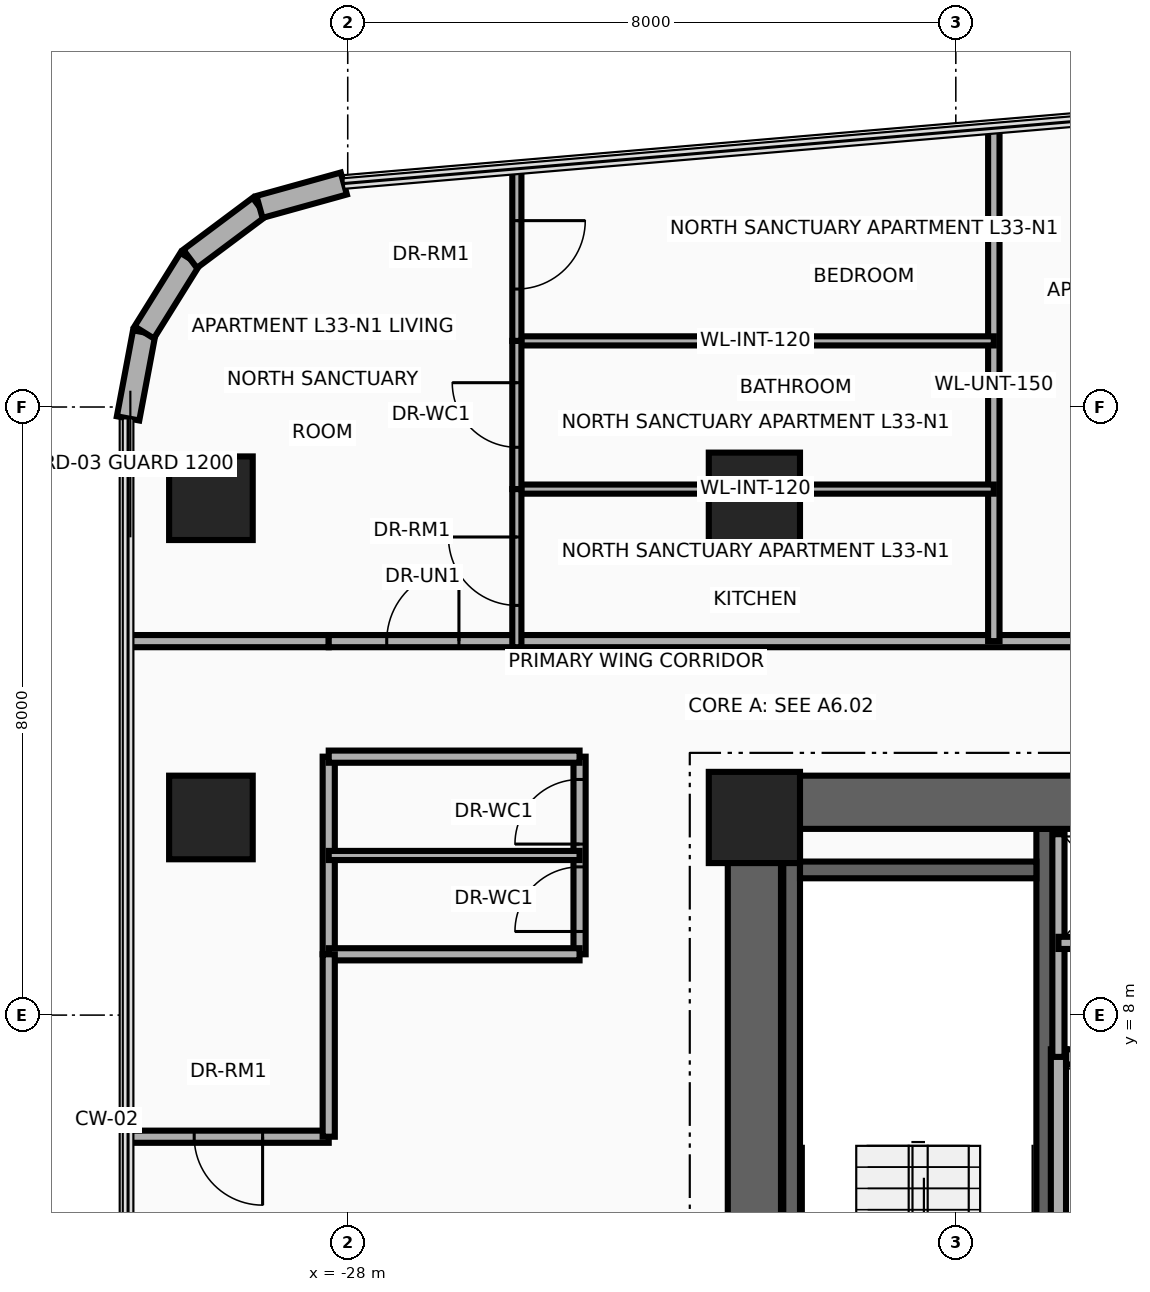
"""IFC4 building model, lengths in metres.
Left out: names, types, materials, properties, quantities, classifications, styles, units other than length and angle.
Written with IfcOpenShell. Run it as: python <this file> out.ifc"""

import sys

from ifc_helpers import new_model, si_unit, direction, frame, frame_2d, origin, origin_2d, place, context, subcontext, project, spatial, rectangle, circle, extrude, source, transform, mapped, element, fill, save


model = new_model("IFC4")
c1 = context("Model", 3, precision=1e-05, world=origin(), true_north=direction((0.0, 1.0)))
c2 = subcontext(c1, "Body", "Model", "MODEL_VIEW")
j1 = project(units=[si_unit("LENGTHUNIT", "METRE"), si_unit("PLANEANGLEUNIT", "RADIAN")], contexts=[c1])
p1 = place(None, origin())
s1 = spatial("IfcSite", under=j1, at=p1, CompositionType="ELEMENT")
p2 = place(p1, origin())
s2 = spatial("IfcBuilding", under=s1, at=p2, CompositionType="ELEMENT")
p3 = place(p2, frame((0.0, 0.0, 131.6)))
s3 = spatial("IfcBuildingStorey", under=s2, at=p3, CompositionType="ELEMENT", Elevation=131.6)
for number, where, z_axis, x_axis in (
    (1, (-22.16, 1.78, 0.0), (0.0, 0.0, 1.0), (0.0, 1.0, 0.0)),
    (2, (-18.83, 1.78, 0.0), (0.0, 0.0, 1.0), (0.0, 1.0, 0.0)),
):
    element("IfcWall", number, at=place(p3, frame(where, z_axis=z_axis, x_axis=x_axis)), inside=s3, PredefinedType="SHEAR", context=c2, shape_type="SweptSolid", body=[
        extrude(rectangle(XDim=8.67, YDim=0.22, at=frame_2d((4.335, 0.0))), origin(), (0.0, 0.0, 1.0), 3.46),
    ])
p4 = place(p3, frame((-22.05, 9.91, 0.0), z_axis=(0.0, 0.0, 1.0), x_axis=(1.0, 0.0, 0.0)))
e3 = element("IfcWall", 3, at=p4, inside=s3, PredefinedType="SHEAR", context=c2, shape_type="SweptSolid", body=[
    extrude(rectangle(XDim=3.11, YDim=0.22, at=frame_2d((1.555, 0.0))), origin(), (0.0, 0.0, 1.0), 3.46),
])
p5 = place(p3, frame((-22.65, -11.15, 0.0), z_axis=(0.0, 0.0, 1.0), x_axis=(0.0, 1.0, 0.0)))
e4 = element("IfcWall", 4, at=p5, inside=s3, PredefinedType="SHEAR", context=c2, shape_type="SweptSolid", body=[
    extrude(rectangle(XDim=22.3, YDim=0.7, at=frame_2d((11.15, 0.0))), origin(), (0.0, 0.0, 1.0), 3.46),
])
p6 = place(p3, frame((-22.65, 10.8, 0.0), z_axis=(0.0, 0.0, 1.0), x_axis=(1.0, 0.0, 0.0)))
e5 = element("IfcWall", 5, at=p6, inside=s3, PredefinedType="SHEAR", context=c2, shape_type="SweptSolid", body=[
    extrude(rectangle(XDim=10.25, YDim=0.7, at=frame_2d((5.125, 0.0))), origin(), (0.0, 0.0, 1.0), 3.46),
])
m1 = source(origin(), c2, "Body", "SweptSolid", [
    extrude(circle(Radius=0.55, at=origin_2d()), origin(), (0.0, 0.0, 1.0), 3.7),
])
p7 = place(p3, frame((-29.8, 10.6, 0.0), z_axis=(0.0, 0.0, 1.0), x_axis=(1.0, 0.0, 0.0)))
e6 = element("IfcColumn", 6, at=p7, inside=s3, PredefinedType="COLUMN", context=c2, shape_type="MappedRepresentation", body=[
    mapped(m1, transform((0.0, 0.0, 0.0), x_axis=(1.0, 0.0, 0.0), y_axis=(0.0, 1.0, 0.0), z_axis=(0.0, 0.0, 1.0), scale=1.0)),
])
m2 = source(origin(), c2, "Body", "SweptSolid", [
    extrude(rectangle(XDim=1.2, YDim=1.2, at=origin_2d()), origin(), (0.0, 0.0, 1.0), 3.7),
])
p8 = place(p3, frame((-22.65, 10.6, 0.0), z_axis=(0.0, 0.0, 1.0), x_axis=(1.0, 0.0, 0.0)))
e7 = element("IfcColumn", 7, at=p8, inside=s3, PredefinedType="COLUMN", context=c2, shape_type="MappedRepresentation", body=[
    mapped(m2, transform((0.0, 0.0, 0.0), x_axis=(1.0, 0.0, 0.0), y_axis=(0.0, 1.0, 0.0), z_axis=(0.0, 0.0, 1.0), scale=1.0)),
])
p9 = place(p3, frame((-29.8, 14.8, 0.0), z_axis=(0.0, 0.0, 1.0), x_axis=(1.0, 0.0, 0.0)))
e8 = element("IfcColumn", 8, at=p9, inside=s3, PredefinedType="COLUMN", context=c2, shape_type="MappedRepresentation", body=[
    mapped(m1, transform((0.0, 0.0, 0.0), x_axis=(1.0, 0.0, 0.0), y_axis=(0.0, 1.0, 0.0), z_axis=(0.0, 0.0, 1.0), scale=1.0)),
])
p10 = place(p3, frame((-22.65, 14.8, 0.0), z_axis=(0.0, 0.0, 1.0), x_axis=(1.0, 0.0, 0.0)))
e9 = element("IfcColumn", 9, at=p10, inside=s3, PredefinedType="COLUMN", context=c2, shape_type="MappedRepresentation", body=[
    mapped(m2, transform((0.0, 0.0, 0.0), x_axis=(1.0, 0.0, 0.0), y_axis=(0.0, 1.0, 0.0), z_axis=(0.0, 0.0, 1.0), scale=1.0)),
])
p11 = place(p3, frame((-30.89, 15.85, 0.0), z_axis=(0.0, 0.0, 1.0), x_axis=(0.184557499391, 0.982821718023, 0.0)))
e10 = element("IfcWall", 10, at=p11, inside=s3, PredefinedType="SOLIDWALL", context=c2, shape_type="SweptSolid", body=[
    extrude(rectangle(XDim=1.151, YDim=0.3, at=frame_2d((0.575, 0.0))), origin(), (0.0, 0.0, 1.0), 3.46),
])
p12 = place(p3, frame((-30.677, 16.981, 0.0), z_axis=(0.0, 0.0, 1.0), x_axis=(0.52880576008, 0.848742875143, 0.0)))
e11 = element("IfcWall", 11, at=p12, inside=s3, PredefinedType="SOLIDWALL", context=c2, shape_type="SweptSolid", body=[
    extrude(rectangle(XDim=1.141, YDim=0.3, at=frame_2d((0.57, 0.0))), origin(), (0.0, 0.0, 1.0), 3.46),
])
p13 = place(p3, frame((-30.074, 17.95, 0.0), z_axis=(0.0, 0.0, 1.0), x_axis=(0.800975009324, 0.598697782223, 0.0)))
e12 = element("IfcWall", 12, at=p13, inside=s3, PredefinedType="SOLIDWALL", context=c2, shape_type="SweptSolid", body=[
    extrude(rectangle(XDim=1.141, YDim=0.3, at=frame_2d((0.57, 0.0))), origin(), (0.0, 0.0, 1.0), 3.46),
])
p14 = place(p3, frame((-29.161, 18.633, 0.0), z_axis=(0.0, 0.0, 1.0), x_axis=(0.963624193367, 0.267260947313, 0.0)))
e13 = element("IfcWall", 13, at=p14, inside=s3, PredefinedType="SOLIDWALL", context=c2, shape_type="SweptSolid", body=[
    extrude(rectangle(XDim=1.151, YDim=0.3, at=frame_2d((0.575, 0.0))), origin(), (0.0, 0.0, 1.0), 3.46),
])
p15 = place(p3, frame((-18.65, 4.225, 0.0), z_axis=(0.0, 0.0, 1.0), x_axis=(0.0, 1.0, 0.0)))
e14 = element("IfcWall", 14, at=p15, inside=s3, PredefinedType="MOVABLE", context=c2, shape_type="SweptSolid", body=[
    extrude(rectangle(XDim=3.325, YDim=0.2, at=frame_2d((1.663, 0.0))), origin(), (0.0, 0.0, 1.0), 3.46),
])
p16 = place(p3, frame((-18.55, 7.45, 0.0), z_axis=(0.0, 0.0, 1.0), x_axis=(1.0, 0.0, 0.0)))
e15 = element("IfcWall", 15, at=p16, inside=s3, PredefinedType="MOVABLE", context=c2, shape_type="SweptSolid", body=[
    extrude(rectangle(XDim=2.6, YDim=0.2, at=frame_2d((1.3, 0.0))), origin(), (0.0, 0.0, 1.0), 3.46),
])
p17 = place(p16, frame((0.7, 0.0, 0.0)))
e16 = element("IfcOpeningElement", 16, at=p17, cuts=e15, PredefinedType="OPENING", context=c2, shape_type="SweptSolid", body=[
    extrude(rectangle(XDim=1.2, YDim=2.1, at=frame_2d((0.6, 1.05))), frame((0.0, 0.115, 0.0), z_axis=(0.0, -1.0, 0.0), x_axis=(1.0, 0.0, 0.0)), (0.0, 0.0, 1.0), 0.23),
])
p18 = place(p3, frame((-18.65, 7.45, 0.0), z_axis=(0.0, 0.0, 1.0), x_axis=(0.0, 1.0, 0.0)))
e17 = element("IfcWall", 17, at=p18, inside=s3, PredefinedType="PARTITIONING", context=c2, shape_type="SweptSolid", body=[
    extrude(rectangle(XDim=2.93, YDim=0.16, at=frame_2d((1.465, 0.0))), origin(), (0.0, 0.0, 1.0), 3.46),
])
p19 = place(p3, frame((-18.65, 8.95, 0.0), z_axis=(0.0, 0.0, 1.0), x_axis=(1.0, 0.0, 0.0)))
e18 = element("IfcWall", 18, at=p19, inside=s3, PredefinedType="PARTITIONING", context=c2, shape_type="SweptSolid", body=[
    extrude(rectangle(XDim=5.5, YDim=0.16, at=frame_2d((2.75, 0.0))), origin(), (0.0, 0.0, 1.0), 3.46),
])
p20 = place(p19, frame((0.3, 0.0, 0.0)))
e19 = element("IfcOpeningElement", 19, at=p20, cuts=e18, PredefinedType="OPENING", context=c2, shape_type="SweptSolid", body=[
    extrude(rectangle(XDim=0.85, YDim=2.05, at=frame_2d((0.425, 1.025))), frame((0.0, 0.095, 0.0), z_axis=(0.0, -1.0, 0.0), x_axis=(1.0, 0.0, 0.0)), (0.0, 0.0, 1.0), 0.19),
])
p21 = place(p19, frame((1.85, 0.0, 0.0)))
e20 = element("IfcOpeningElement", 20, at=p21, cuts=e18, PredefinedType="OPENING", context=c2, shape_type="SweptSolid", body=[
    extrude(rectangle(XDim=0.85, YDim=2.05, at=frame_2d((0.425, 1.025))), frame((0.0, 0.095, 0.0), z_axis=(0.0, -1.0, 0.0), x_axis=(1.0, 0.0, 0.0)), (0.0, 0.0, 1.0), 0.19),
])
p22 = place(p19, frame((3.9, 0.0, 0.0)))
e21 = element("IfcOpeningElement", 21, at=p22, cuts=e18, PredefinedType="OPENING", context=c2, shape_type="SweptSolid", body=[
    extrude(rectangle(XDim=0.85, YDim=2.05, at=frame_2d((0.425, 1.025))), frame((0.0, 0.095, 0.0), z_axis=(0.0, -1.0, 0.0), x_axis=(1.0, 0.0, 0.0)), (0.0, 0.0, 1.0), 0.19),
])
p23 = place(p3, frame((-28.25, 8.8, 0.0), z_axis=(0.0, 0.0, 1.0), x_axis=(0.0, 1.0, 0.0)))
e22 = element("IfcWall", 22, at=p23, inside=s3, PredefinedType="PARTITIONING", context=c2, shape_type="SweptSolid", body=[
    extrude(rectangle(XDim=2.6, YDim=0.16, at=frame_2d((1.3, 0.0))), origin(), (0.0, 0.0, 1.0), 2.666),
])
p24 = place(p3, frame((-24.95, 8.8, 0.0), z_axis=(0.0, 0.0, 1.0), x_axis=(0.0, 1.0, 0.0)))
e23 = element("IfcWall", 23, at=p24, inside=s3, PredefinedType="PARTITIONING", context=c2, shape_type="SweptSolid", body=[
    extrude(rectangle(XDim=2.6, YDim=0.16, at=frame_2d((1.3, 0.0))), origin(), (0.0, 0.0, 1.0), 2.666),
])
p25 = place(p24, frame((0.3, 0.0, 0.0)))
e24 = element("IfcOpeningElement", 24, at=p25, cuts=e23, PredefinedType="OPENING", context=c2, shape_type="SweptSolid", body=[
    extrude(rectangle(XDim=0.85, YDim=2.1, at=frame_2d((0.425, 1.05))), frame((0.0, 0.095, 0.0), z_axis=(0.0, -1.0, 0.0), x_axis=(1.0, 0.0, 0.0)), (0.0, 0.0, 1.0), 0.19),
])
p26 = place(p24, frame((1.45, 0.0, 0.0)))
e25 = element("IfcOpeningElement", 25, at=p26, cuts=e23, PredefinedType="OPENING", context=c2, shape_type="SweptSolid", body=[
    extrude(rectangle(XDim=0.85, YDim=2.1, at=frame_2d((0.425, 1.05))), frame((0.0, 0.095, 0.0), z_axis=(0.0, -1.0, 0.0), x_axis=(1.0, 0.0, 0.0)), (0.0, 0.0, 1.0), 0.19),
])
for number, where, z_axis, x_axis in (
    (26, (-28.25, 8.8, 0.0), (0.0, 0.0, 1.0), (1.0, 0.0, 0.0)),
    (27, (-28.25, 11.4, 0.0), (0.0, 0.0, 1.0), (1.0, 0.0, 0.0)),
):
    element("IfcWall", number, at=place(p3, frame(where, z_axis=z_axis, x_axis=x_axis)), inside=s3, PredefinedType="PARTITIONING", context=c2, shape_type="SweptSolid", body=[
        extrude(rectangle(XDim=3.3, YDim=0.16, at=frame_2d((1.65, 0.0))), origin(), (0.0, 0.0, 1.0), 3.46),
    ])
p27 = place(p3, frame((-28.25, 10.1, 0.0), z_axis=(0.0, 0.0, 1.0), x_axis=(1.0, 0.0, 0.0)))
e28 = element("IfcWall", 28, at=p27, inside=s3, PredefinedType="PARTITIONING", context=c2, shape_type="SweptSolid", body=[
    extrude(rectangle(XDim=3.3, YDim=0.12, at=frame_2d((1.65, 0.0))), origin(), (0.0, 0.0, 1.0), 3.46),
])
p28 = place(p3, frame((-30.89, 6.4, 0.0), z_axis=(0.0, 0.0, 1.0), x_axis=(1.0, 0.0, 0.0)))
e29 = element("IfcWall", 29, at=p28, inside=s3, PredefinedType="PARTITIONING", context=c2, shape_type="SweptSolid", body=[
    extrude(rectangle(XDim=2.64, YDim=0.16, at=frame_2d((1.32, 0.0))), origin(), (0.0, 0.0, 1.0), 2.896),
])
p29 = place(p28, frame((0.87, 0.0, 0.0)))
e30 = element("IfcOpeningElement", 30, at=p29, cuts=e29, PredefinedType="OPENING", context=c2, shape_type="SweptSolid", body=[
    extrude(rectangle(XDim=0.9, YDim=2.1, at=frame_2d((0.45, 1.05))), frame((0.0, 0.095, 0.0), z_axis=(0.0, -1.0, 0.0), x_axis=(1.0, 0.0, 0.0)), (0.0, 0.0, 1.0), 0.19),
])
p30 = place(p3, frame((-28.25, 6.4, 0.0), z_axis=(0.0, 0.0, 1.0), x_axis=(0.0, 1.0, 0.0)))
e31 = element("IfcWall", 31, at=p30, inside=s3, PredefinedType="PARTITIONING", context=c2, shape_type="SweptSolid", body=[
    extrude(rectangle(XDim=2.4, YDim=0.16, at=frame_2d((1.2, 0.0))), origin(), (0.0, 0.0, 1.0), 2.988),
])
p31 = place(p3, frame((-30.89, 12.92, 0.0), z_axis=(0.0, 0.0, 1.0), x_axis=(1.0, 0.0, 0.0)))
e32 = element("IfcWall", 32, at=p31, inside=s3, PredefinedType="PARTITIONING", context=c2, shape_type="SweptSolid", body=[
    extrude(rectangle(XDim=2.64, YDim=0.16, at=frame_2d((1.32, 0.0))), origin(), (0.0, 0.0, 1.0), 2.896),
])
p32 = place(p3, frame((-28.25, 12.92, 0.0), z_axis=(0.0, 0.0, 1.0), x_axis=(1.0, 0.0, 0.0)))
e33 = element("IfcWall", 33, at=p32, inside=s3, PredefinedType="PARTITIONING", context=c2, shape_type="SweptSolid", body=[
    extrude(rectangle(XDim=41.8, YDim=0.16, at=frame_2d((20.9, 0.0))), origin(), (0.0, 0.0, 1.0), 2.666),
])
p33 = place(p32, frame((0.763, 0.0, 0.0)))
e34 = element("IfcOpeningElement", 34, at=p33, cuts=e33, PredefinedType="OPENING", context=c2, shape_type="SweptSolid", body=[
    extrude(rectangle(XDim=0.95, YDim=2.15, at=frame_2d((0.475, 1.075))), frame((0.0, 0.095, 0.0), z_axis=(0.0, -1.0, 0.0), x_axis=(1.0, 0.0, 0.0)), (0.0, 0.0, 1.0), 0.19),
])
p34 = place(p32, frame((10.696, 0.0, 0.0)))
e35 = element("IfcOpeningElement", 35, at=p34, cuts=e33, PredefinedType="OPENING", context=c2, shape_type="SweptSolid", body=[
    extrude(rectangle(XDim=0.95, YDim=2.15, at=frame_2d((0.475, 1.075))), frame((0.0, 0.095, 0.0), z_axis=(0.0, -1.0, 0.0), x_axis=(1.0, 0.0, 0.0)), (0.0, 0.0, 1.0), 0.19),
])
p35 = place(p32, frame((22.215, 0.0, 0.0)))
e36 = element("IfcOpeningElement", 36, at=p35, cuts=e33, PredefinedType="OPENING", context=c2, shape_type="SweptSolid", body=[
    extrude(rectangle(XDim=0.95, YDim=2.15, at=frame_2d((0.475, 1.075))), frame((0.0, 0.095, 0.0), z_axis=(0.0, -1.0, 0.0), x_axis=(1.0, 0.0, 0.0)), (0.0, 0.0, 1.0), 0.19),
])
p36 = place(p32, frame((32.652, 0.0, 0.0)))
e37 = element("IfcOpeningElement", 37, at=p36, cuts=e33, PredefinedType="OPENING", context=c2, shape_type="SweptSolid", body=[
    extrude(rectangle(XDim=0.95, YDim=2.15, at=frame_2d((0.475, 1.075))), frame((0.0, 0.095, 0.0), z_axis=(0.0, -1.0, 0.0), x_axis=(1.0, 0.0, 0.0)), (0.0, 0.0, 1.0), 0.19),
])
p37 = place(p3, frame((-19.5, 12.92, 0.0), z_axis=(0.0, 0.0, 1.0), x_axis=(0.0, 1.0, 0.0)))
e38 = element("IfcWall", 38, at=p37, inside=s3, PredefinedType="PARTITIONING", context=c2, shape_type="SweptSolid", body=[
    extrude(rectangle(XDim=6.747, YDim=0.15, at=frame_2d((3.374, 0.0))), origin(), (0.0, 0.0, 1.0), 2.666),
])
p38 = place(p3, frame((-25.775, 14.92, 0.0), z_axis=(0.0, 0.0, 1.0), x_axis=(1.0, 0.0, 0.0)))
e39 = element("IfcWall", 39, at=p38, inside=s3, PredefinedType="PARTITIONING", context=c2, shape_type="SweptSolid", body=[
    extrude(rectangle(XDim=6.275, YDim=0.12, at=frame_2d((3.137, 0.0))), origin(), (0.0, 0.0, 1.0), 2.666),
])
p39 = place(p3, frame((-25.775, 16.87, 0.0), z_axis=(0.0, 0.0, 1.0), x_axis=(1.0, 0.0, 0.0)))
e40 = element("IfcWall", 40, at=p39, inside=s3, PredefinedType="PARTITIONING", context=c2, shape_type="SweptSolid", body=[
    extrude(rectangle(XDim=6.275, YDim=0.12, at=frame_2d((3.137, 0.0))), origin(), (0.0, 0.0, 1.0), 3.46),
])
p40 = place(p3, frame((-25.775, 14.92, 0.0), z_axis=(0.0, 0.0, 1.0), x_axis=(0.0, 1.0, 0.0)))
e41 = element("IfcWall", 41, at=p40, inside=s3, PredefinedType="PARTITIONING", context=c2, shape_type="SweptSolid", body=[
    extrude(rectangle(XDim=1.95, YDim=0.12, at=frame_2d((0.975, 0.0))), origin(), (0.0, 0.0, 1.0), 2.666),
])
p41 = place(p40, frame((0.55, 0.0, 0.0)))
e42 = element("IfcOpeningElement", 42, at=p41, cuts=e41, PredefinedType="OPENING", context=c2, shape_type="SweptSolid", body=[
    extrude(rectangle(XDim=0.85, YDim=2.1, at=frame_2d((0.425, 1.05))), frame((0.0, 0.075, 0.0), z_axis=(0.0, -1.0, 0.0), x_axis=(1.0, 0.0, 0.0)), (0.0, 0.0, 1.0), 0.15),
])
p42 = place(p3, frame((-25.775, 12.84, 0.0), z_axis=(0.0, 0.0, 1.0), x_axis=(0.0, 1.0, 0.0)))
e43 = element("IfcWall", 43, at=p42, inside=s3, PredefinedType="PARTITIONING", context=c2, shape_type="SweptSolid", body=[
    extrude(rectangle(XDim=2.08, YDim=0.12, at=frame_2d((1.04, 0.0))), origin(), (0.0, 0.0, 1.0), 2.666),
])
p43 = place(p42, frame((0.55, 0.0, 0.0)))
e44 = element("IfcOpeningElement", 44, at=p43, cuts=e43, PredefinedType="OPENING", context=c2, shape_type="SweptSolid", body=[
    extrude(rectangle(XDim=0.9, YDim=2.1, at=frame_2d((0.45, 1.05))), frame((0.0, 0.075, 0.0), z_axis=(0.0, -1.0, 0.0), x_axis=(1.0, 0.0, 0.0)), (0.0, 0.0, 1.0), 0.15),
])
p44 = place(p3, frame((-25.775, 16.87, 0.0), z_axis=(0.0, 0.0, 1.0), x_axis=(0.0, 1.0, 0.0)))
e45 = element("IfcWall", 45, at=p44, inside=s3, PredefinedType="PARTITIONING", context=c2, shape_type="SweptSolid", body=[
    extrude(rectangle(XDim=2.264, YDim=0.12, at=frame_2d((1.132, 0.0))), origin(), (0.0, 0.0, 1.0), 3.46),
])
p45 = place(p44, frame((0.682, 0.0, 0.0)))
e46 = element("IfcOpeningElement", 46, at=p45, cuts=e45, PredefinedType="OPENING", context=c2, shape_type="SweptSolid", body=[
    extrude(rectangle(XDim=0.9, YDim=2.1, at=frame_2d((0.45, 1.05))), frame((0.0, 0.075, 0.0), z_axis=(0.0, -1.0, 0.0), x_axis=(1.0, 0.0, 0.0)), (0.0, 0.0, 1.0), 0.15),
])
p46 = place(p25, origin())
e47 = element("IfcDoor", 47, at=p46, inside=s3, OperationType="SINGLE_SWING_LEFT", PredefinedType="DOOR", context=c2, shape_type="SweptSolid", body=[
    extrude(rectangle(XDim=0.85, YDim=2.1, at=frame_2d((0.425, 1.05))), frame((0.0, 0.025, 0.0), z_axis=(0.0, -1.0, 0.0), x_axis=(1.0, 0.0, 0.0)), (0.0, 0.0, 1.0), 0.05),
])
fill(e24, e47)
p47 = place(p26, origin())
e48 = element("IfcDoor", 48, at=p47, inside=s3, OperationType="SINGLE_SWING_RIGHT", PredefinedType="DOOR", context=c2, shape_type="SweptSolid", body=[
    extrude(rectangle(XDim=0.85, YDim=2.1, at=frame_2d((0.425, 1.05))), frame((0.0, 0.025, 0.0), z_axis=(0.0, -1.0, 0.0), x_axis=(1.0, 0.0, 0.0)), (0.0, 0.0, 1.0), 0.05),
])
fill(e25, e48)
p48 = place(p29, frame((0.9, 0.0, 0.0), z_axis=(0.0, 0.0, 1.0), x_axis=(-1.0, 0.0, 0.0)))
e49 = element("IfcDoor", 49, at=p48, inside=s3, OperationType="SINGLE_SWING_LEFT", PredefinedType="DOOR", context=c2, shape_type="SweptSolid", body=[
    extrude(rectangle(XDim=0.9, YDim=2.1, at=frame_2d((0.45, 1.05))), frame((0.0, 0.025, 0.0), z_axis=(0.0, -1.0, 0.0), x_axis=(1.0, 0.0, 0.0)), (0.0, 0.0, 1.0), 0.05),
])
fill(e30, e49)
p49 = place(p33, origin())
e50 = element("IfcDoor", 50, at=p49, inside=s3, OperationType="SINGLE_SWING_RIGHT", PredefinedType="DOOR", context=c2, shape_type="SweptSolid", body=[
    extrude(rectangle(XDim=0.95, YDim=2.15, at=frame_2d((0.475, 1.075))), frame((0.0, 0.025, 0.0), z_axis=(0.0, -1.0, 0.0), x_axis=(1.0, 0.0, 0.0)), (0.0, 0.0, 1.0), 0.05),
])
fill(e34, e50)
p50 = place(p41, origin())
e51 = element("IfcDoor", 51, at=p50, inside=s3, OperationType="SINGLE_SWING_LEFT", PredefinedType="DOOR", context=c2, shape_type="SweptSolid", body=[
    extrude(rectangle(XDim=0.85, YDim=2.1, at=frame_2d((0.425, 1.05))), frame((0.0, 0.025, 0.0), z_axis=(0.0, -1.0, 0.0), x_axis=(1.0, 0.0, 0.0)), (0.0, 0.0, 1.0), 0.05),
])
fill(e42, e51)
p51 = place(p43, origin())
e52 = element("IfcDoor", 52, at=p51, inside=s3, OperationType="SINGLE_SWING_RIGHT", PredefinedType="DOOR", context=c2, shape_type="SweptSolid", body=[
    extrude(rectangle(XDim=0.9, YDim=2.1, at=frame_2d((0.45, 1.05))), frame((0.0, 0.025, 0.0), z_axis=(0.0, -1.0, 0.0), x_axis=(1.0, 0.0, 0.0)), (0.0, 0.0, 1.0), 0.05),
])
fill(e44, e52)
p52 = place(p45, frame((0.9, 0.0, 0.0), z_axis=(0.0, 0.0, 1.0), x_axis=(-1.0, 0.0, 0.0)))
e53 = element("IfcDoor", 53, at=p52, inside=s3, OperationType="SINGLE_SWING_LEFT", PredefinedType="DOOR", context=c2, shape_type="SweptSolid", body=[
    extrude(rectangle(XDim=0.9, YDim=2.1, at=frame_2d((0.45, 1.05))), frame((0.0, 0.025, 0.0), z_axis=(0.0, -1.0, 0.0), x_axis=(1.0, 0.0, 0.0)), (0.0, 0.0, 1.0), 0.05),
])
fill(e46, e53)
save(model, sys.argv[1])
